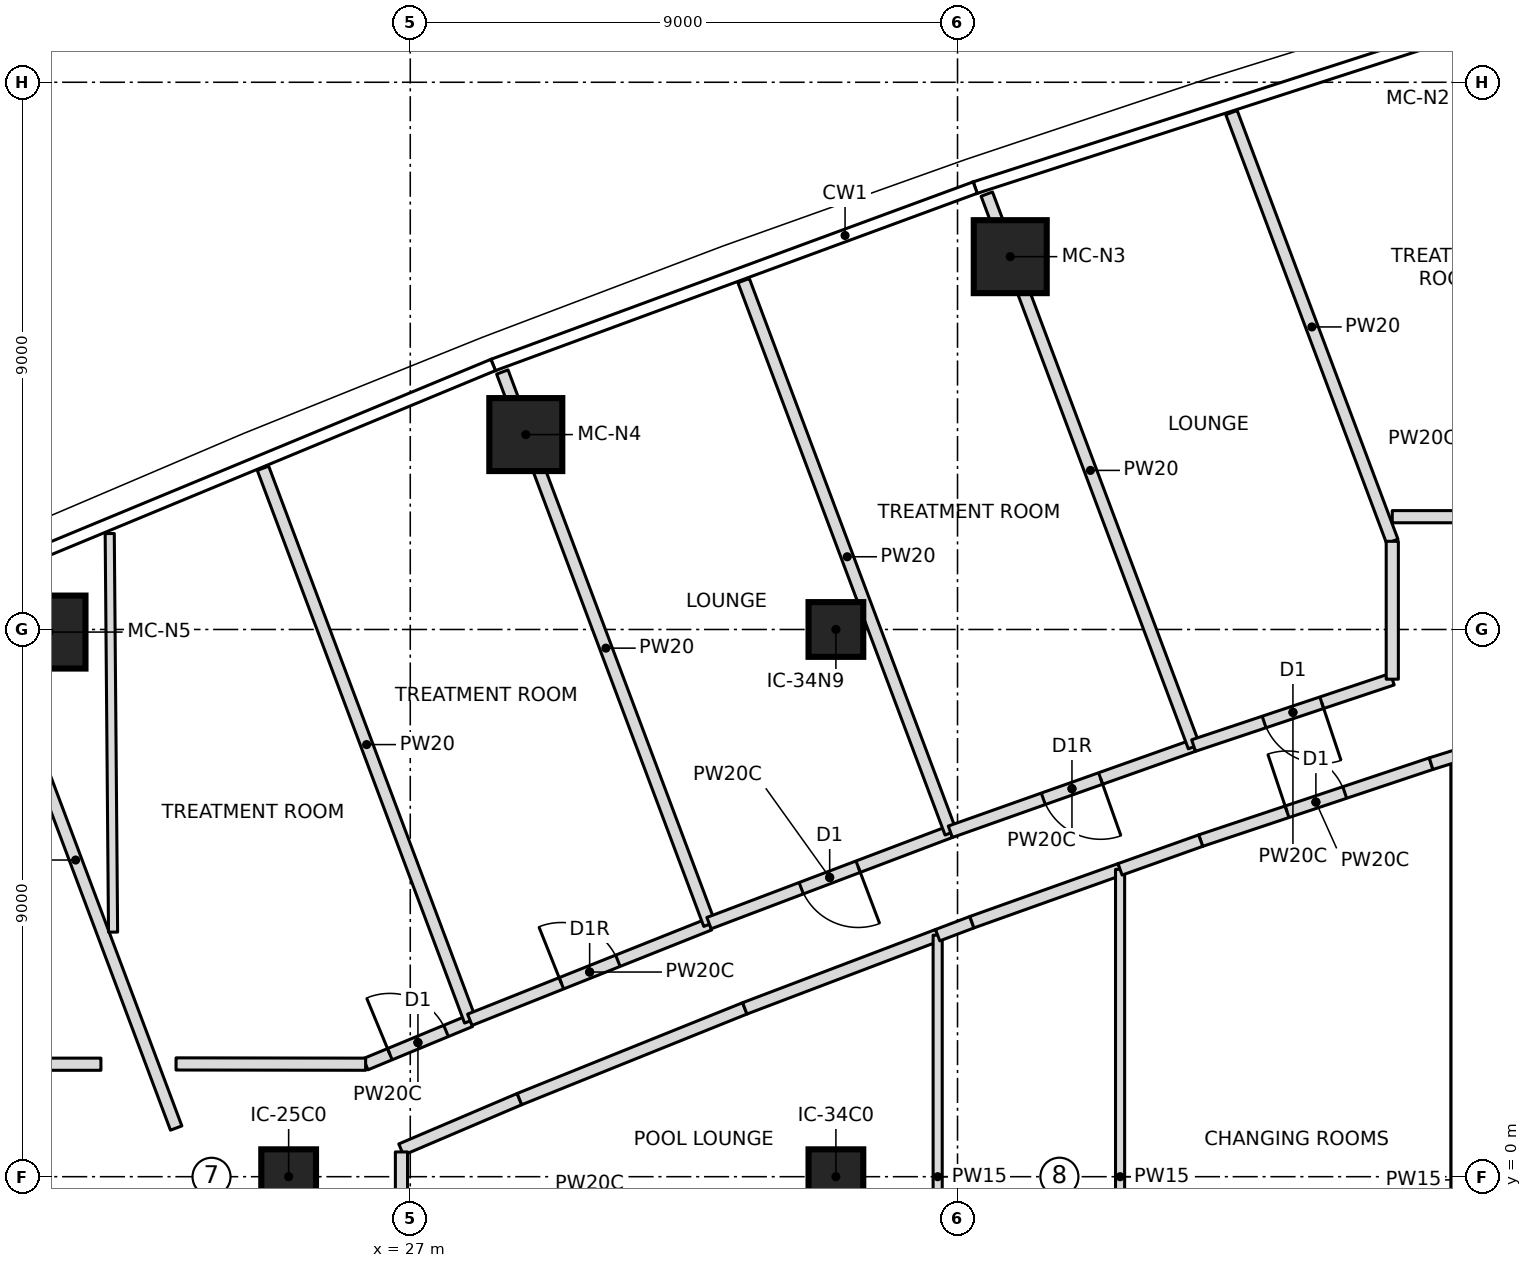
"""IFC4 building model, lengths in metres.
Left out: names, types, materials, properties, quantities, classifications, styles, units other than length and angle.
Written with IfcOpenShell. Run it as: python <this file> out.ifc"""

import sys

from ifc_helpers import new_model, si_unit, direction, frame, frame_2d, origin, origin_2d, place, context, subcontext, project, spatial, rectangle, extrude, element, fill, save


model = new_model("IFC4")
c1 = context("Model", 3, precision=1e-05, world=origin(), true_north=direction((0.0, 1.0)))
c2 = subcontext(c1, "Body", "Model", "MODEL_VIEW")
j1 = project(units=[si_unit("LENGTHUNIT", "METRE"), si_unit("PLANEANGLEUNIT", "RADIAN")], contexts=[c1])
p1 = place(None, origin())
s1 = spatial("IfcSite", under=j1, at=p1, CompositionType="ELEMENT")
p2 = place(p1, origin())
s2 = spatial("IfcBuilding", under=s1, at=p2, CompositionType="ELEMENT")
p3 = place(p2, frame((0.0, 0.0, 245.65)))
s3 = spatial("IfcBuildingStorey", under=s2, at=p3, CompositionType="ELEMENT", Elevation=245.65)
for number, where, z_axis, x_axis in (
    (1, (36.867, 15.132, 0.0), (0.0, 0.0, 1.0), (1.0, 0.0, 0.0)),
    (2, (28.9, 12.205, 0.0), (0.0, 0.0, 1.0), (1.0, 0.0, 0.0)),
    (3, (21.059, 8.958, 0.0), (0.0, 0.0, 1.0), (1.0, 0.0, 0.0)),
):
    element("IfcColumn", number, at=place(p3, frame(where, z_axis=z_axis, x_axis=x_axis)), inside=s3, PredefinedType="COLUMN", context=c2, shape_type="SweptSolid", body=[
        extrude(rectangle(XDim=1.2, YDim=1.2, at=origin_2d()), origin(), (0.0, 0.0, 1.0), 3.55),
    ])
for number, where, z_axis, x_axis in (
    (4, (25.0, 0.0, 0.0), (0.0, 0.0, 1.0), (1.0, 0.0, 0.0)),
    (5, (34.0, 0.0, 0.0), (0.0, 0.0, 1.0), (1.0, 0.0, 0.0)),
    (6, (34.0, 9.0, 0.0), (0.0, 0.0, 1.0), (1.0, 0.0, 0.0)),
):
    element("IfcColumn", number, at=place(p3, frame(where, z_axis=z_axis, x_axis=x_axis)), inside=s3, PredefinedType="COLUMN", context=c2, shape_type="SweptSolid", body=[
        extrude(rectangle(XDim=0.9, YDim=0.9, at=origin_2d()), origin(), (0.0, 0.0, 1.0), 3.55),
    ])
p4 = place(p3, frame((6.725, 1.85, 0.0), z_axis=(0.0, 0.0, 1.0), x_axis=(1.0, 0.0, 0.0)))
e7 = element("IfcWall", 7, at=p4, inside=s3, PredefinedType="PARTITIONING", context=c2, shape_type="SweptSolid", body=[
    extrude(rectangle(XDim=15.188, YDim=0.2, at=frame_2d((7.594, 0.0))), origin(), (0.0, 0.0, 1.0), 3.25),
])
p5 = place(p4, frame((7.257, 0.0, 0.0)))
e8 = element("IfcOpeningElement", 8, at=p5, cuts=e7, PredefinedType="OPENING", context=c2, shape_type="SweptSolid", body=[
    extrude(rectangle(XDim=1.0, YDim=2.1, at=frame_2d((0.5, 1.05))), frame((0.0, 0.11, 0.0), z_axis=(0.0, -1.0, 0.0), x_axis=(1.0, 0.0, 0.0)), (0.0, 0.0, 1.0), 0.22),
])
p6 = place(p3, frame((23.15, 0.8, 0.0), z_axis=(0.0, 0.0, 1.0), x_axis=(-0.351123441588, 0.936329177569, 0.0)))
e9 = element("IfcWall", 9, at=p6, inside=s3, PredefinedType="PARTITIONING", context=c2, shape_type="SweptSolid", body=[
    extrude(rectangle(XDim=9.416, YDim=0.2, at=frame_2d((4.708, 0.0))), origin(), (0.0, 0.0, 1.0), 3.25),
])
p7 = place(p3, frame((26.266, 1.85, 0.0), z_axis=(0.0, 0.0, 1.0), x_axis=(0.924055156704, 0.382259162569, 0.0)))
e10 = element("IfcWall", 10, at=p7, inside=s3, PredefinedType="PARTITIONING", context=c2, shape_type="SweptSolid", body=[
    extrude(rectangle(XDim=1.862, YDim=0.2, at=frame_2d((0.931, 0.0))), origin(), (0.0, 0.0, 1.0), 3.25),
])
p8 = place(p7, frame((0.431, 0.0, 0.0)))
e11 = element("IfcOpeningElement", 11, at=p8, cuts=e10, PredefinedType="OPENING", context=c2, shape_type="SweptSolid", body=[
    extrude(rectangle(XDim=1.0, YDim=2.1, at=frame_2d((0.5, 1.05))), frame((0.0, 0.11, 0.0), z_axis=(0.0, -1.0, 0.0), x_axis=(1.0, 0.0, 0.0)), (0.0, 0.0, 1.0), 0.22),
])
p9 = place(p3, frame((27.987, 2.562, 0.0), z_axis=(0.0, 0.0, 1.0), x_axis=(-0.351153757858, 0.936317808408, 0.0)))
e12 = element("IfcWall", 12, at=p9, inside=s3, PredefinedType="PARTITIONING", context=c2, shape_type="SweptSolid", body=[
    extrude(rectangle(XDim=9.708, YDim=0.2, at=frame_2d((4.854, 0.0))), origin(), (0.0, 0.0, 1.0), 3.25),
])
p10 = place(p3, frame((27.98, 2.581, 0.0), z_axis=(0.0, 0.0, 1.0), x_axis=(0.928920552813, 0.370279092795, 0.0)))
e13 = element("IfcWall", 13, at=p10, inside=s3, PredefinedType="PARTITIONING", context=c2, shape_type="SweptSolid", body=[
    extrude(rectangle(XDim=4.242, YDim=0.2, at=frame_2d((2.121, 0.0))), origin(), (0.0, 0.0, 1.0), 3.25),
])
p11 = place(p10, frame((1.621, 0.0, 0.0)))
e14 = element("IfcOpeningElement", 14, at=p11, cuts=e13, PredefinedType="OPENING", context=c2, shape_type="SweptSolid", body=[
    extrude(rectangle(XDim=1.0, YDim=2.1, at=frame_2d((0.5, 1.05))), frame((0.0, 0.11, 0.0), z_axis=(0.0, -1.0, 0.0), x_axis=(1.0, 0.0, 0.0)), (0.0, 0.0, 1.0), 0.22),
])
p12 = place(p3, frame((31.92, 4.151, 0.0), z_axis=(0.0, 0.0, 1.0), x_axis=(-0.351126199585, 0.936328143316, 0.0)))
e15 = element("IfcWall", 15, at=p12, inside=s3, PredefinedType="PARTITIONING", context=c2, shape_type="SweptSolid", body=[
    extrude(rectangle(XDim=9.701, YDim=0.2, at=frame_2d((4.851, 0.0))), origin(), (0.0, 0.0, 1.0), 3.25),
])
p13 = place(p3, frame((35.882, 5.673, 0.0), z_axis=(0.0, 0.0, 1.0), x_axis=(-0.935189471058, -0.354147784438, 0.0)))
e16 = element("IfcWall", 16, at=p13, inside=s3, PredefinedType="PARTITIONING", context=c2, shape_type="SweptSolid", body=[
    extrude(rectangle(XDim=4.244, YDim=0.2, at=frame_2d((2.122, 0.0))), origin(), (0.0, 0.0, 1.0), 3.25),
])
p14 = place(p13, frame((1.622, 0.0, 0.0)))
e17 = element("IfcOpeningElement", 17, at=p14, cuts=e16, PredefinedType="OPENING", context=c2, shape_type="SweptSolid", body=[
    extrude(rectangle(XDim=1.0, YDim=2.1, at=frame_2d((0.5, 1.05))), frame((0.0, 0.11, 0.0), z_axis=(0.0, -1.0, 0.0), x_axis=(1.0, 0.0, 0.0)), (0.0, 0.0, 1.0), 0.22),
])
p15 = place(p3, frame((35.889, 5.654, 0.0), z_axis=(0.0, 0.0, 1.0), x_axis=(-0.351117925717, 0.936331246002, 0.0)))
e18 = element("IfcWall", 18, at=p15, inside=s3, PredefinedType="PARTITIONING", context=c2, shape_type="SweptSolid", body=[
    extrude(rectangle(XDim=9.701, YDim=0.2, at=frame_2d((4.851, 0.0))), origin(), (0.0, 0.0, 1.0), 3.25),
])
p16 = place(p3, frame((39.882, 7.091, 0.0), z_axis=(0.0, 0.0, 1.0), x_axis=(-0.942537055217, -0.334101630559, 0.0)))
e19 = element("IfcWall", 19, at=p16, inside=s3, PredefinedType="PARTITIONING", context=c2, shape_type="SweptSolid", body=[
    extrude(rectangle(XDim=4.244, YDim=0.2, at=frame_2d((2.122, 0.0))), origin(), (0.0, 0.0, 1.0), 3.25),
])
p17 = place(p16, frame((1.622, 0.0, 0.0)))
e20 = element("IfcOpeningElement", 20, at=p17, cuts=e19, PredefinedType="OPENING", context=c2, shape_type="SweptSolid", body=[
    extrude(rectangle(XDim=1.0, YDim=2.1, at=frame_2d((0.5, 1.05))), frame((0.0, 0.11, 0.0), z_axis=(0.0, -1.0, 0.0), x_axis=(1.0, 0.0, 0.0)), (0.0, 0.0, 1.0), 0.22),
])
p18 = place(p3, frame((39.889, 7.072, 0.0), z_axis=(0.0, 0.0, 1.0), x_axis=(-0.35112895446, 0.936327110224, 0.0)))
e21 = element("IfcWall", 21, at=p18, inside=s3, PredefinedType="PARTITIONING", context=c2, shape_type="SweptSolid", body=[
    extrude(rectangle(XDim=9.706, YDim=0.2, at=frame_2d((4.853, 0.0))), origin(), (0.0, 0.0, 1.0), 3.25),
])
p19 = place(p3, frame((43.15, 8.183, 0.0), z_axis=(0.0, 0.0, 1.0), x_axis=(-0.948477584784, -0.316844238013, 0.0)))
e22 = element("IfcWall", 22, at=p19, inside=s3, PredefinedType="PARTITIONING", context=c2, shape_type="SweptSolid", body=[
    extrude(rectangle(XDim=3.445, YDim=0.2, at=frame_2d((1.723, 0.0))), origin(), (0.0, 0.0, 1.0), 3.25),
])
p20 = place(p19, frame((1.222, 0.0, 0.0)))
e23 = element("IfcOpeningElement", 23, at=p20, cuts=e22, PredefinedType="OPENING", context=c2, shape_type="SweptSolid", body=[
    extrude(rectangle(XDim=1.0, YDim=2.1, at=frame_2d((0.5, 1.05))), frame((0.0, 0.11, 0.0), z_axis=(0.0, -1.0, 0.0), x_axis=(1.0, 0.0, 0.0)), (0.0, 0.0, 1.0), 0.22),
])
p21 = place(p3, frame((43.15, 10.45, 0.0), z_axis=(0.0, 0.0, 1.0), x_axis=(-0.351119888923, 0.936330509811, 0.0)))
e24 = element("IfcWall", 24, at=p21, inside=s3, PredefinedType="PARTITIONING", context=c2, shape_type="SweptSolid", body=[
    extrude(rectangle(XDim=7.531, YDim=0.2, at=frame_2d((3.766, 0.0))), origin(), (0.0, 0.0, 1.0), 3.25),
])
p22 = place(p3, frame((26.85, 0.447, 0.0), z_axis=(0.0, 0.0, 1.0), x_axis=(0.91990756443, 0.392135273732, 0.0)))
e25 = element("IfcWall", 25, at=p22, inside=s3, PredefinedType="PARTITIONING", context=c2, shape_type="SweptSolid", body=[
    extrude(rectangle(XDim=2.115, YDim=0.2, at=frame_2d((1.058, 0.0))), origin(), (0.0, 0.0, 1.0), 3.25),
])
p23 = place(p3, frame((28.796, 1.276, 0.0), z_axis=(0.0, 0.0, 1.0), x_axis=(0.927622894464, 0.373518092823, 0.0)))
e26 = element("IfcWall", 26, at=p23, inside=s3, PredefinedType="PARTITIONING", context=c2, shape_type="SweptSolid", body=[
    extrude(rectangle(XDim=3.995, YDim=0.2, at=frame_2d((1.998, 0.0))), origin(), (0.0, 0.0, 1.0), 3.25),
])
p24 = place(p3, frame((32.501, 2.768, 0.0), z_axis=(0.0, 0.0, 1.0), x_axis=(0.93495884859, 0.354756185912, 0.0)))
e27 = element("IfcWall", 27, at=p24, inside=s3, PredefinedType="PARTITIONING", context=c2, shape_type="SweptSolid", body=[
    extrude(rectangle(XDim=3.393, YDim=0.2, at=frame_2d((1.696, 0.0))), origin(), (0.0, 0.0, 1.0), 3.25),
])
p25 = place(p3, frame((35.674, -3.972, 0.0), z_axis=(0.0, 0.0, 1.0), x_axis=(0.0, 1.0, 0.0)))
e28 = element("IfcWall", 28, at=p25, inside=s3, PredefinedType="PARTITIONING", context=c2, shape_type="SweptSolid", body=[
    extrude(rectangle(XDim=7.944, YDim=0.15, at=frame_2d((3.972, 0.0))), origin(), (0.0, 0.0, 1.0), 3.25),
])
p26 = place(p3, frame((35.674, 3.972, 0.0), z_axis=(0.0, 0.0, 1.0), x_axis=(0.934904737906, 0.354898761678, 0.0)))
e29 = element("IfcWall", 29, at=p26, inside=s3, PredefinedType="PARTITIONING", context=c2, shape_type="SweptSolid", body=[
    extrude(rectangle(XDim=0.602, YDim=0.2, at=frame_2d((0.301, 0.0))), origin(), (0.0, 0.0, 1.0), 3.25),
])
p27 = place(p3, frame((36.236, 4.186, 0.0), z_axis=(0.0, 0.0, 1.0), x_axis=(0.941901902054, 0.335888086879, 0.0)))
e30 = element("IfcWall", 30, at=p27, inside=s3, PredefinedType="PARTITIONING", context=c2, shape_type="SweptSolid", body=[
    extrude(rectangle(XDim=2.588, YDim=0.2, at=frame_2d((1.294, 0.0))), origin(), (0.0, 0.0, 1.0), 3.25),
])
p28 = place(p3, frame((38.674, -5.055, 0.0), z_axis=(0.0, 0.0, 1.0), x_axis=(0.0, 1.0, 0.0)))
e31 = element("IfcWall", 31, at=p28, inside=s3, PredefinedType="PARTITIONING", context=c2, shape_type="SweptSolid", body=[
    extrude(rectangle(XDim=10.109, YDim=0.15, at=frame_2d((5.055, 0.0))), origin(), (0.0, 0.0, 1.0), 3.25),
])
p29 = place(p3, frame((39.999, 5.527, 0.0), z_axis=(0.0, 0.0, 1.0), x_axis=(0.948469186567, 0.316869377084, 0.0)))
e32 = element("IfcWall", 32, at=p29, inside=s3, PredefinedType="PARTITIONING", context=c2, shape_type="SweptSolid", body=[
    extrude(rectangle(XDim=3.995, YDim=0.2, at=frame_2d((1.998, 0.0))), origin(), (0.0, 0.0, 1.0), 3.25),
])
p30 = place(p29, frame((1.498, 0.0, 0.0)))
e33 = element("IfcOpeningElement", 33, at=p30, cuts=e32, PredefinedType="OPENING", context=c2, shape_type="SweptSolid", body=[
    extrude(rectangle(XDim=1.0, YDim=2.1, at=frame_2d((0.5, 1.05))), frame((0.0, 0.11, 0.0), z_axis=(0.0, -1.0, 0.0), x_axis=(1.0, 0.0, 0.0)), (0.0, 0.0, 1.0), 0.22),
])
p31 = place(p3, frame((38.674, 5.055, 0.0), z_axis=(0.0, 0.0, 1.0), x_axis=(0.941922306529, 0.33583086288, 0.0)))
e34 = element("IfcWall", 34, at=p31, inside=s3, PredefinedType="PARTITIONING", context=c2, shape_type="SweptSolid", body=[
    extrude(rectangle(XDim=1.407, YDim=0.2, at=frame_2d((0.704, 0.0))), origin(), (0.0, 0.0, 1.0), 3.25),
])
p32 = place(p3, frame((44.188, -6.918, 0.0), z_axis=(0.0, 0.0, 1.0), x_axis=(0.0, 1.0, 0.0)))
e35 = element("IfcWall", 35, at=p32, inside=s3, PredefinedType="PARTITIONING", context=c2, shape_type="SweptSolid", body=[
    extrude(rectangle(XDim=13.731, YDim=0.15, at=frame_2d((6.866, 0.0))), origin(), (0.0, 0.0, 1.0), 3.25),
])
p33 = place(p3, frame((22.057, 10.578, 0.0), z_axis=(0.0, 0.0, 1.0), x_axis=(0.008379594055, -0.999964890585, 0.0)))
e36 = element("IfcWall", 36, at=p33, inside=s3, PredefinedType="PARTITIONING", context=c2, shape_type="SweptSolid", body=[
    extrude(rectangle(XDim=6.555, YDim=0.15, at=frame_2d((3.278, 0.0))), origin(), (0.0, 0.0, 1.0), 3.25),
])
p34 = place(p3, frame((26.855, -0.407, 0.0), z_axis=(0.0, 0.0, 1.0), x_axis=(0.0, 1.0, 0.0)))
e37 = element("IfcWall", 37, at=p34, inside=s3, PredefinedType="PARTITIONING", context=c2, shape_type="SweptSolid", body=[
    extrude(rectangle(XDim=0.814, YDim=0.2, at=frame_2d((0.407, 0.0))), origin(), (0.0, 0.0, 1.0), 3.25),
])
p35 = place(p3, frame((26.266, 1.85, 0.0), z_axis=(0.0, 0.0, 1.0), x_axis=(-0.999999006581, 0.001409552241, 0.0)))
e38 = element("IfcWall", 38, at=p35, inside=s3, PredefinedType="PARTITIONING", context=c2, shape_type="SweptSolid", body=[
    extrude(rectangle(XDim=3.118, YDim=0.2, at=frame_2d((1.559, 0.0))), origin(), (0.0, 0.0, 1.0), 3.25),
])
p36 = place(p3, frame((43.15, 10.45, 0.0), z_axis=(0.0, 0.0, 1.0), x_axis=(0.0, -1.0, 0.0)))
e39 = element("IfcWall", 39, at=p36, inside=s3, PredefinedType="PARTITIONING", context=c2, shape_type="SweptSolid", body=[
    extrude(rectangle(XDim=2.267, YDim=0.2, at=frame_2d((1.134, 0.0))), origin(), (0.0, 0.0, 1.0), 3.25),
])
p37 = place(p3, frame((43.788, 6.793, 0.0), z_axis=(0.0, 0.0, 1.0), x_axis=(0.95462504626, 0.297810377679, 0.0)))
e40 = element("IfcWall", 40, at=p37, inside=s3, PredefinedType="PARTITIONING", context=c2, shape_type="SweptSolid", body=[
    extrude(rectangle(XDim=0.419, YDim=0.2, at=frame_2d((0.209, 0.0))), origin(), (0.0, 0.0, 1.0), 3.25),
])
p38 = place(p3, frame((46.711, 10.855, 0.0), z_axis=(0.0, 0.0, 1.0), x_axis=(-1.0, 0.0, 0.0)))
e41 = element("IfcWall", 41, at=p38, inside=s3, PredefinedType="PARTITIONING", context=c2, shape_type="SweptSolid", body=[
    extrude(rectangle(XDim=3.562, YDim=0.2, at=frame_2d((1.781, 0.0))), origin(), (0.0, 0.0, 1.0), 3.25),
])
p39 = place(p8, origin())
e42 = element("IfcDoor", 42, at=p39, inside=s3, OperationType="SINGLE_SWING_LEFT", PredefinedType="DOOR", context=c2, shape_type="SweptSolid", body=[
    extrude(rectangle(XDim=1.0, YDim=2.1, at=frame_2d((0.5, 1.05))), frame((0.0, 0.025, 0.0), z_axis=(0.0, -1.0, 0.0), x_axis=(1.0, 0.0, 0.0)), (0.0, 0.0, 1.0), 0.05),
])
fill(e11, e42)
p40 = place(p11, origin())
e43 = element("IfcDoor", 43, at=p40, inside=s3, OperationType="SINGLE_SWING_RIGHT", PredefinedType="DOOR", context=c2, shape_type="SweptSolid", body=[
    extrude(rectangle(XDim=1.0, YDim=2.1, at=frame_2d((0.5, 1.05))), frame((0.0, 0.025, 0.0), z_axis=(0.0, -1.0, 0.0), x_axis=(1.0, 0.0, 0.0)), (0.0, 0.0, 1.0), 0.05),
])
fill(e14, e43)
p41 = place(p14, origin())
e44 = element("IfcDoor", 44, at=p41, inside=s3, OperationType="SINGLE_SWING_LEFT", PredefinedType="DOOR", context=c2, shape_type="SweptSolid", body=[
    extrude(rectangle(XDim=1.0, YDim=2.1, at=frame_2d((0.5, 1.05))), frame((0.0, 0.025, 0.0), z_axis=(0.0, -1.0, 0.0), x_axis=(1.0, 0.0, 0.0)), (0.0, 0.0, 1.0), 0.05),
])
fill(e17, e44)
p42 = place(p17, origin())
e45 = element("IfcDoor", 45, at=p42, inside=s3, OperationType="SINGLE_SWING_RIGHT", PredefinedType="DOOR", context=c2, shape_type="SweptSolid", body=[
    extrude(rectangle(XDim=1.0, YDim=2.1, at=frame_2d((0.5, 1.05))), frame((0.0, 0.025, 0.0), z_axis=(0.0, -1.0, 0.0), x_axis=(1.0, 0.0, 0.0)), (0.0, 0.0, 1.0), 0.05),
])
fill(e20, e45)
p43 = place(p20, origin())
e46 = element("IfcDoor", 46, at=p43, inside=s3, OperationType="SINGLE_SWING_LEFT", PredefinedType="DOOR", context=c2, shape_type="SweptSolid", body=[
    extrude(rectangle(XDim=1.0, YDim=2.1, at=frame_2d((0.5, 1.05))), frame((0.0, 0.025, 0.0), z_axis=(0.0, -1.0, 0.0), x_axis=(1.0, 0.0, 0.0)), (0.0, 0.0, 1.0), 0.05),
])
fill(e23, e46)
p44 = place(p30, origin())
e47 = element("IfcDoor", 47, at=p44, inside=s3, OperationType="SINGLE_SWING_LEFT", PredefinedType="DOOR", context=c2, shape_type="SweptSolid", body=[
    extrude(rectangle(XDim=1.0, YDim=2.1, at=frame_2d((0.5, 1.05))), frame((0.0, 0.025, 0.0), z_axis=(0.0, -1.0, 0.0), x_axis=(1.0, 0.0, 0.0)), (0.0, 0.0, 1.0), 0.05),
])
fill(e33, e47)
save(model, sys.argv[1])
